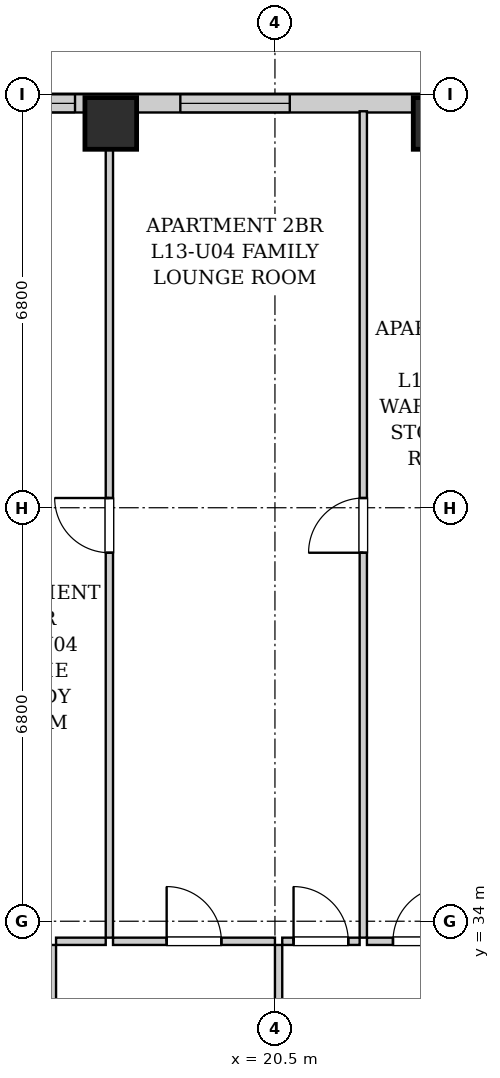
"""IFC4 building model, lengths in metres.
Left out: names, types, materials, properties, quantities, classifications, styles, units other than length and angle.
Written with IfcOpenShell. Run it as: python <this file> out.ifc"""

import sys

from ifc_helpers import new_model, si_unit, direction, frame, frame_2d, origin, origin_2d, place, context, subcontext, project, spatial, rectangle, extrude, element, fill, save


model = new_model("IFC4")
c1 = context("Model", 3, precision=1e-05, world=origin(), true_north=direction((0.0, 1.0)))
c2 = subcontext(c1, "Body", "Model", "MODEL_VIEW")
j1 = project(units=[si_unit("LENGTHUNIT", "METRE"), si_unit("PLANEANGLEUNIT", "RADIAN")], contexts=[c1])
p1 = place(None, origin())
s1 = spatial("IfcSite", under=j1, at=p1, CompositionType="ELEMENT")
p2 = place(p1, origin())
s2 = spatial("IfcBuilding", under=s1, at=p2, CompositionType="ELEMENT")
p3 = place(p2, frame((0.0, 0.0, 51.4)))
s3 = spatial("IfcBuildingStorey", under=s2, at=p3, CompositionType="ELEMENT", Elevation=51.4)
for number, where, z_axis, x_axis in (
    (1, (17.8, 47.12, 0.0), (0.0, 0.0, 1.0), (1.0, 0.0, 0.0)),
    (2, (23.2, 47.12, 0.0), (0.0, 0.0, 1.0), (1.0, 0.0, 0.0)),
):
    element("IfcColumn", number, at=place(p3, frame(where, z_axis=z_axis, x_axis=x_axis)), inside=s3, PredefinedType="COLUMN", context=c2, shape_type="SweptSolid", body=[
        extrude(rectangle(XDim=0.85, YDim=0.85, at=origin_2d()), origin(), (0.0, 0.0, 1.0), 3.2),
    ])
p4 = place(p3, frame((10.0, 47.45, 0.0), z_axis=(0.0, 0.0, 1.0), x_axis=(1.0, 0.0, 0.0)))
e3 = element("IfcWall", 3, at=p4, inside=s3, PredefinedType="SOLIDWALL", context=c2, shape_type="SweptSolid", body=[
    extrude(rectangle(XDim=26.15, YDim=0.3, at=frame_2d((13.075, 0.0))), origin(), (0.0, 0.0, 1.0), 1.975),
])
p5 = place(p4, frame((5.862, 0.0, 0.55)))
e4 = element("IfcOpeningElement", 4, at=p5, cuts=e3, PredefinedType="OPENING", context=c2, shape_type="SweptSolid", body=[
    extrude(rectangle(XDim=1.35, YDim=1.2, at=frame_2d((0.675, 0.6))), frame((0.0, 0.16, 0.0), z_axis=(0.0, -1.0, 0.0), x_axis=(1.0, 0.0, 0.0)), (0.0, 0.0, 1.0), 0.32),
])
p6 = place(p4, frame((8.944, 0.0, 0.55)))
e5 = element("IfcOpeningElement", 5, at=p6, cuts=e3, PredefinedType="OPENING", context=c2, shape_type="SweptSolid", body=[
    extrude(rectangle(XDim=1.8, YDim=1.2, at=frame_2d((0.9, 0.6))), frame((0.0, 0.16, 0.0), z_axis=(0.0, -1.0, 0.0), x_axis=(1.0, 0.0, 0.0)), (0.0, 0.0, 1.0), 0.32),
])
p7 = place(p4, frame((18.788, 0.0, 0.55)))
e6 = element("IfcOpeningElement", 6, at=p7, cuts=e3, PredefinedType="OPENING", context=c2, shape_type="SweptSolid", body=[
    extrude(rectangle(XDim=1.8, YDim=1.2, at=frame_2d((0.9, 0.6))), frame((0.0, 0.16, 0.0), z_axis=(0.0, -1.0, 0.0), x_axis=(1.0, 0.0, 0.0)), (0.0, 0.0, 1.0), 0.32),
])
p8 = place(p4, frame((21.265, 0.0, 0.55)))
e7 = element("IfcOpeningElement", 7, at=p8, cuts=e3, PredefinedType="OPENING", context=c2, shape_type="SweptSolid", body=[
    extrude(rectangle(XDim=1.35, YDim=1.2, at=frame_2d((0.675, 0.6))), frame((0.0, 0.16, 0.0), z_axis=(0.0, -1.0, 0.0), x_axis=(1.0, 0.0, 0.0)), (0.0, 0.0, 1.0), 0.32),
])
p9 = place(p4, frame((23.785, 0.0, 0.55)))
e8 = element("IfcOpeningElement", 8, at=p9, cuts=e3, PredefinedType="OPENING", context=c2, shape_type="SweptSolid", body=[
    extrude(rectangle(XDim=1.8, YDim=1.2, at=frame_2d((0.9, 0.6))), frame((0.0, 0.16, 0.0), z_axis=(0.0, -1.0, 0.0), x_axis=(1.0, 0.0, 0.0)), (0.0, 0.0, 1.0), 0.32),
])
p10 = place(p3, frame((16.84, 30.76, 0.0), z_axis=(0.0, 0.0, 1.0), x_axis=(0.0, 1.0, 0.0)))
e9 = element("IfcWall", 9, at=p10, inside=s3, PredefinedType="PARTITIONING", context=c2, shape_type="SweptSolid", body=[
    extrude(rectangle(XDim=2.85, YDim=0.12, at=frame_2d((1.425, 0.0))), origin(), (0.0, 0.0, 1.0), 2.94),
])
p11 = place(p10, frame((0.975, 0.0, 0.0)))
e10 = element("IfcOpeningElement", 10, at=p11, cuts=e9, PredefinedType="OPENING", context=c2, shape_type="SweptSolid", body=[
    extrude(rectangle(XDim=0.9, YDim=2.05, at=frame_2d((0.45, 1.025))), frame((0.0, 0.07, 0.0), z_axis=(0.0, -1.0, 0.0), x_axis=(1.0, 0.0, 0.0)), (0.0, 0.0, 1.0), 0.14),
])
p12 = place(p3, frame((20.56, 30.76, 0.0), z_axis=(0.0, 0.0, 1.0), x_axis=(0.0, 1.0, 0.0)))
e11 = element("IfcWall", 11, at=p12, inside=s3, PredefinedType="PARTITIONING", context=c2, shape_type="SweptSolid", body=[
    extrude(rectangle(XDim=2.85, YDim=0.12, at=frame_2d((1.425, 0.0))), origin(), (0.0, 0.0, 1.0), 2.94),
])
p13 = place(p12, frame((0.975, 0.0, 0.0)))
e12 = element("IfcOpeningElement", 12, at=p13, cuts=e11, PredefinedType="OPENING", context=c2, shape_type="SweptSolid", body=[
    extrude(rectangle(XDim=0.9, YDim=2.05, at=frame_2d((0.45, 1.025))), frame((0.0, 0.07, 0.0), z_axis=(0.0, -1.0, 0.0), x_axis=(1.0, 0.0, 0.0)), (0.0, 0.0, 1.0), 0.14),
])
p14 = place(p3, frame((16.9, 33.67, 0.0), z_axis=(0.0, 0.0, 1.0), x_axis=(1.0, 0.0, 0.0)))
e13 = element("IfcWall", 13, at=p14, inside=s3, PredefinedType="PARTITIONING", context=c2, shape_type="SweptSolid", body=[
    extrude(rectangle(XDim=0.817, YDim=0.12, at=frame_2d((0.409, 0.0))), origin(), (0.0, 0.0, 1.0), 2.94),
])
p15 = place(p3, frame((17.837, 33.67, 0.0), z_axis=(0.0, 0.0, 1.0), x_axis=(1.0, 0.0, 0.0)))
e14 = element("IfcWall", 14, at=p15, inside=s3, PredefinedType="PARTITIONING", context=c2, shape_type="SweptSolid", body=[
    extrude(rectangle(XDim=2.663, YDim=0.12, at=frame_2d((1.332, 0.0))), origin(), (0.0, 0.0, 1.0), 2.94),
])
p16 = place(p15, frame((0.882, 0.0, 0.0)))
e15 = element("IfcOpeningElement", 15, at=p16, cuts=e14, PredefinedType="OPENING", context=c2, shape_type="SweptSolid", body=[
    extrude(rectangle(XDim=0.9, YDim=2.05, at=frame_2d((0.45, 1.025))), frame((0.0, 0.07, 0.0), z_axis=(0.0, -1.0, 0.0), x_axis=(1.0, 0.0, 0.0)), (0.0, 0.0, 1.0), 0.14),
])
p17 = place(p3, frame((20.62, 33.67, 0.0), z_axis=(0.0, 0.0, 1.0), x_axis=(1.0, 0.0, 0.0)))
e16 = element("IfcWall", 16, at=p17, inside=s3, PredefinedType="PARTITIONING", context=c2, shape_type="SweptSolid", body=[
    extrude(rectangle(XDim=1.273, YDim=0.12, at=frame_2d((0.636, 0.0))), origin(), (0.0, 0.0, 1.0), 2.94),
])
p18 = place(p17, frame((0.186, 0.0, 0.0)))
e17 = element("IfcOpeningElement", 17, at=p18, cuts=e16, PredefinedType="OPENING", context=c2, shape_type="SweptSolid", body=[
    extrude(rectangle(XDim=0.9, YDim=2.05, at=frame_2d((0.45, 1.025))), frame((0.0, 0.07, 0.0), z_axis=(0.0, -1.0, 0.0), x_axis=(1.0, 0.0, 0.0)), (0.0, 0.0, 1.0), 0.14),
])
p19 = place(p3, frame((22.013, 33.67, 0.0), z_axis=(0.0, 0.0, 1.0), x_axis=(1.0, 0.0, 0.0)))
e18 = element("IfcWall", 18, at=p19, inside=s3, PredefinedType="PARTITIONING", context=c2, shape_type="SweptSolid", body=[
    extrude(rectangle(XDim=1.757, YDim=0.12, at=frame_2d((0.878, 0.0))), origin(), (0.0, 0.0, 1.0), 2.94),
])
p20 = place(p19, frame((0.428, 0.0, 0.0)))
e19 = element("IfcOpeningElement", 19, at=p20, cuts=e18, PredefinedType="OPENING", context=c2, shape_type="SweptSolid", body=[
    extrude(rectangle(XDim=0.9, YDim=2.05, at=frame_2d((0.45, 1.025))), frame((0.0, 0.07, 0.0), z_axis=(0.0, -1.0, 0.0), x_axis=(1.0, 0.0, 0.0)), (0.0, 0.0, 1.0), 0.14),
])
p21 = place(p3, frame((17.777, 33.73, 0.0), z_axis=(0.0, 0.0, 1.0), x_axis=(0.0, 1.0, 0.0)))
e20 = element("IfcWall", 20, at=p21, inside=s3, PredefinedType="PARTITIONING", context=c2, shape_type="SweptSolid", body=[
    extrude(rectangle(XDim=13.59, YDim=0.12, at=frame_2d((6.795, 0.0))), origin(), (0.0, 0.0, 1.0), 2.232),
])
p22 = place(p21, frame((6.33, 0.0, 0.0)))
e21 = element("IfcOpeningElement", 21, at=p22, cuts=e20, PredefinedType="OPENING", context=c2, shape_type="SweptSolid", body=[
    extrude(rectangle(XDim=0.9, YDim=2.05, at=frame_2d((0.45, 1.025))), frame((0.0, 0.07, 0.0), z_axis=(0.0, -1.0, 0.0), x_axis=(1.0, 0.0, 0.0)), (0.0, 0.0, 1.0), 0.14),
])
p23 = place(p3, frame((21.953, 33.73, 0.0), z_axis=(0.0, 0.0, 1.0), x_axis=(0.0, 1.0, 0.0)))
e22 = element("IfcWall", 22, at=p23, inside=s3, PredefinedType="PARTITIONING", context=c2, shape_type="SweptSolid", body=[
    extrude(rectangle(XDim=13.59, YDim=0.12, at=frame_2d((6.795, 0.0))), origin(), (0.0, 0.0, 1.0), 2.94),
])
p24 = place(p23, frame((6.33, 0.0, 0.0)))
e23 = element("IfcOpeningElement", 23, at=p24, cuts=e22, PredefinedType="OPENING", context=c2, shape_type="SweptSolid", body=[
    extrude(rectangle(XDim=0.9, YDim=2.05, at=frame_2d((0.45, 1.025))), frame((0.0, 0.07, 0.0), z_axis=(0.0, -1.0, 0.0), x_axis=(1.0, 0.0, 0.0)), (0.0, 0.0, 1.0), 0.14),
])
p25 = place(p16, origin())
e24 = element("IfcDoor", 24, at=p25, inside=s3, OperationType="SINGLE_SWING_LEFT", PredefinedType="DOOR", context=c2, shape_type="SweptSolid", body=[
    extrude(rectangle(XDim=0.9, YDim=2.05, at=frame_2d((0.45, 1.025))), frame((0.0, 0.025, 0.0), z_axis=(0.0, -1.0, 0.0), x_axis=(1.0, 0.0, 0.0)), (0.0, 0.0, 1.0), 0.05),
])
fill(e15, e24)
p26 = place(p18, origin())
e25 = element("IfcDoor", 25, at=p26, inside=s3, OperationType="SINGLE_SWING_LEFT", PredefinedType="DOOR", context=c2, shape_type="SweptSolid", body=[
    extrude(rectangle(XDim=0.9, YDim=2.05, at=frame_2d((0.45, 1.025))), frame((0.0, 0.025, 0.0), z_axis=(0.0, -1.0, 0.0), x_axis=(1.0, 0.0, 0.0)), (0.0, 0.0, 1.0), 0.05),
])
fill(e17, e25)
p27 = place(p20, origin())
e26 = element("IfcDoor", 26, at=p27, inside=s3, OperationType="SINGLE_SWING_RIGHT", PredefinedType="DOOR", context=c2, shape_type="SweptSolid", body=[
    extrude(rectangle(XDim=0.9, YDim=2.05, at=frame_2d((0.45, 1.025))), frame((0.0, 0.025, 0.0), z_axis=(0.0, -1.0, 0.0), x_axis=(1.0, 0.0, 0.0)), (0.0, 0.0, 1.0), 0.05),
])
fill(e19, e26)
p28 = place(p22, origin())
e27 = element("IfcDoor", 27, at=p28, inside=s3, OperationType="SINGLE_SWING_RIGHT", PredefinedType="DOOR", context=c2, shape_type="SweptSolid", body=[
    extrude(rectangle(XDim=0.9, YDim=2.05, at=frame_2d((0.45, 1.025))), frame((0.0, 0.025, 0.0), z_axis=(0.0, -1.0, 0.0), x_axis=(1.0, 0.0, 0.0)), (0.0, 0.0, 1.0), 0.05),
])
fill(e21, e27)
p29 = place(p24, origin())
e28 = element("IfcDoor", 28, at=p29, inside=s3, OperationType="SINGLE_SWING_LEFT", PredefinedType="DOOR", context=c2, shape_type="SweptSolid", body=[
    extrude(rectangle(XDim=0.9, YDim=2.05, at=frame_2d((0.45, 1.025))), frame((0.0, 0.025, 0.0), z_axis=(0.0, -1.0, 0.0), x_axis=(1.0, 0.0, 0.0)), (0.0, 0.0, 1.0), 0.05),
])
fill(e23, e28)
p30 = place(p5, origin())
e29 = element("IfcWindow", 29, at=p30, inside=s3, PartitioningType="SINGLE_PANEL", PredefinedType="WINDOW", context=c2, shape_type="SweptSolid", body=[
    extrude(rectangle(XDim=1.35, YDim=1.2, at=frame_2d((0.675, 0.6))), frame((0.0, 0.03, 0.0), z_axis=(0.0, -1.0, 0.0), x_axis=(1.0, 0.0, 0.0)), (0.0, 0.0, 1.0), 0.06),
])
fill(e4, e29)
p31 = place(p6, origin())
e30 = element("IfcWindow", 30, at=p31, inside=s3, PartitioningType="DOUBLE_PANEL_VERTICAL", PredefinedType="WINDOW", context=c2, shape_type="SweptSolid", body=[
    extrude(rectangle(XDim=1.8, YDim=1.2, at=frame_2d((0.9, 0.6))), frame((0.0, 0.03, 0.0), z_axis=(0.0, -1.0, 0.0), x_axis=(1.0, 0.0, 0.0)), (0.0, 0.0, 1.0), 0.06),
])
fill(e5, e30)
save(model, sys.argv[1])
